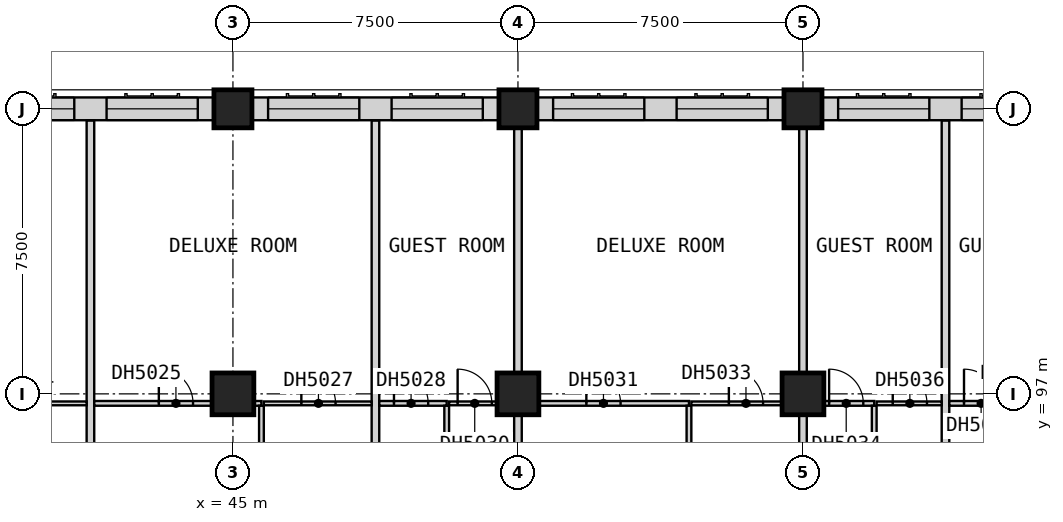
"""IFC4 building model, lengths in metres.
Left out: names, types, materials, properties, quantities, classifications, styles, units other than length and angle.
Written with IfcOpenShell. Run it as: python <this file> out.ifc"""

import sys

from ifc_helpers import new_model, si_unit, direction, frame, frame_2d, origin, origin_2d, place, context, subcontext, project, spatial, rectangle, extrude, element, fill, save


model = new_model("IFC4")
c1 = context("Model", 3, precision=1e-05, world=origin(), true_north=direction((0.0, 1.0)))
c2 = subcontext(c1, "Body", "Model", "MODEL_VIEW")
j1 = project(units=[si_unit("LENGTHUNIT", "METRE"), si_unit("PLANEANGLEUNIT", "RADIAN")], contexts=[c1])
p1 = place(None, origin())
s1 = spatial("IfcSite", under=j1, at=p1, CompositionType="ELEMENT")
p2 = place(p1, origin())
s2 = spatial("IfcBuilding", under=s1, at=p2, CompositionType="ELEMENT")
p3 = place(p2, frame((0.0, 0.0, 79.1)))
s3 = spatial("IfcBuildingStorey", under=s2, at=p3, CompositionType="ELEMENT", Elevation=79.1)
p4 = place(p3, frame((45.0, 97.0, 0.0), z_axis=(0.0, 0.0, 1.0), x_axis=(1.0, 0.0, 0.0)))
e1 = element("IfcColumn", 1, at=p4, inside=s3, PredefinedType="COLUMN", context=c2, shape_type="SweptSolid", body=[
    extrude(rectangle(XDim=1.1, YDim=1.1, at=origin_2d()), origin(), (0.0, 0.0, 1.0), 3.6),
])
p5 = place(p3, frame((45.0, 104.5, 0.0), z_axis=(0.0, 0.0, 1.0), x_axis=(1.0, 0.0, 0.0)))
e2 = element("IfcColumn", 2, at=p5, inside=s3, PredefinedType="COLUMN", context=c2, shape_type="SweptSolid", body=[
    extrude(rectangle(XDim=1.0, YDim=1.0, at=origin_2d()), origin(), (0.0, 0.0, 1.0), 3.6),
])
p6 = place(p3, frame((52.5, 97.0, 0.0), z_axis=(0.0, 0.0, 1.0), x_axis=(1.0, 0.0, 0.0)))
e3 = element("IfcColumn", 3, at=p6, inside=s3, PredefinedType="COLUMN", context=c2, shape_type="SweptSolid", body=[
    extrude(rectangle(XDim=1.1, YDim=1.1, at=origin_2d()), origin(), (0.0, 0.0, 1.0), 3.6),
])
p7 = place(p3, frame((52.5, 104.5, 0.0), z_axis=(0.0, 0.0, 1.0), x_axis=(1.0, 0.0, 0.0)))
e4 = element("IfcColumn", 4, at=p7, inside=s3, PredefinedType="COLUMN", context=c2, shape_type="SweptSolid", body=[
    extrude(rectangle(XDim=1.0, YDim=1.0, at=origin_2d()), origin(), (0.0, 0.0, 1.0), 3.6),
])
p8 = place(p3, frame((60.0, 97.0, 0.0), z_axis=(0.0, 0.0, 1.0), x_axis=(1.0, 0.0, 0.0)))
e5 = element("IfcColumn", 5, at=p8, inside=s3, PredefinedType="COLUMN", context=c2, shape_type="SweptSolid", body=[
    extrude(rectangle(XDim=1.1, YDim=1.1, at=origin_2d()), origin(), (0.0, 0.0, 1.0), 3.6),
])
p9 = place(p3, frame((60.0, 104.5, 0.0), z_axis=(0.0, 0.0, 1.0), x_axis=(1.0, 0.0, 0.0)))
e6 = element("IfcColumn", 6, at=p9, inside=s3, PredefinedType="COLUMN", context=c2, shape_type="SweptSolid", body=[
    extrude(rectangle(XDim=1.0, YDim=1.0, at=origin_2d()), origin(), (0.0, 0.0, 1.0), 3.6),
])
p10 = place(p3, frame((67.0, 104.5, 0.0), z_axis=(0.0, 0.0, 1.0), x_axis=(-1.0, 0.0, 0.0)))
e7 = element("IfcWall", 7, at=p10, inside=s3, PredefinedType="SOLIDWALL", context=c2, shape_type="SweptSolid", body=[
    extrude(rectangle(XDim=6.5, YDim=0.6, at=frame_2d((3.25, 0.0))), origin(), (0.0, 0.0, 1.0), 2.85),
])
p11 = place(p10, frame((3.675, 0.0, 0.8)))
e8 = element("IfcOpeningElement", 8, at=p11, cuts=e7, PredefinedType="OPENING", context=c2, shape_type="SweptSolid", body=[
    extrude(rectangle(XDim=2.4, YDim=1.8, at=frame_2d((1.2, 0.9))), frame((0.0, 0.31, 0.0), z_axis=(0.0, -1.0, 0.0), x_axis=(1.0, 0.0, 0.0)), (0.0, 0.0, 1.0), 0.62),
])
p12 = place(p10, frame((0.425, 0.0, 0.8)))
e9 = element("IfcOpeningElement", 9, at=p12, cuts=e7, PredefinedType="OPENING", context=c2, shape_type="SweptSolid", body=[
    extrude(rectangle(XDim=2.4, YDim=1.8, at=frame_2d((1.2, 0.9))), frame((0.0, 0.31, 0.0), z_axis=(0.0, -1.0, 0.0), x_axis=(1.0, 0.0, 0.0)), (0.0, 0.0, 1.0), 0.62),
])
p13 = place(p3, frame((59.5, 104.5, 0.0), z_axis=(0.0, 0.0, 1.0), x_axis=(-1.0, 0.0, 0.0)))
e10 = element("IfcWall", 10, at=p13, inside=s3, PredefinedType="SOLIDWALL", context=c2, shape_type="SweptSolid", body=[
    extrude(rectangle(XDim=6.5, YDim=0.6, at=frame_2d((3.25, 0.0))), origin(), (0.0, 0.0, 1.0), 2.85),
])
p14 = place(p13, frame((3.675, 0.0, 0.8)))
e11 = element("IfcOpeningElement", 11, at=p14, cuts=e10, PredefinedType="OPENING", context=c2, shape_type="SweptSolid", body=[
    extrude(rectangle(XDim=2.4, YDim=1.8, at=frame_2d((1.2, 0.9))), frame((0.0, 0.31, 0.0), z_axis=(0.0, -1.0, 0.0), x_axis=(1.0, 0.0, 0.0)), (0.0, 0.0, 1.0), 0.62),
])
p15 = place(p13, frame((0.425, 0.0, 0.8)))
e12 = element("IfcOpeningElement", 12, at=p15, cuts=e10, PredefinedType="OPENING", context=c2, shape_type="SweptSolid", body=[
    extrude(rectangle(XDim=2.4, YDim=1.8, at=frame_2d((1.2, 0.9))), frame((0.0, 0.31, 0.0), z_axis=(0.0, -1.0, 0.0), x_axis=(1.0, 0.0, 0.0)), (0.0, 0.0, 1.0), 0.62),
])
p16 = place(p3, frame((52.0, 104.5, 0.0), z_axis=(0.0, 0.0, 1.0), x_axis=(-1.0, 0.0, 0.0)))
e13 = element("IfcWall", 13, at=p16, inside=s3, PredefinedType="SOLIDWALL", context=c2, shape_type="SweptSolid", body=[
    extrude(rectangle(XDim=6.5, YDim=0.6, at=frame_2d((3.25, 0.0))), origin(), (0.0, 0.0, 1.0), 2.85),
])
p17 = place(p16, frame((3.675, 0.0, 0.8)))
e14 = element("IfcOpeningElement", 14, at=p17, cuts=e13, PredefinedType="OPENING", context=c2, shape_type="SweptSolid", body=[
    extrude(rectangle(XDim=2.4, YDim=1.8, at=frame_2d((1.2, 0.9))), frame((0.0, 0.31, 0.0), z_axis=(0.0, -1.0, 0.0), x_axis=(1.0, 0.0, 0.0)), (0.0, 0.0, 1.0), 0.62),
])
p18 = place(p16, frame((0.425, 0.0, 0.8)))
e15 = element("IfcOpeningElement", 15, at=p18, cuts=e13, PredefinedType="OPENING", context=c2, shape_type="SweptSolid", body=[
    extrude(rectangle(XDim=2.4, YDim=1.8, at=frame_2d((1.2, 0.9))), frame((0.0, 0.31, 0.0), z_axis=(0.0, -1.0, 0.0), x_axis=(1.0, 0.0, 0.0)), (0.0, 0.0, 1.0), 0.62),
])
p19 = place(p3, frame((44.5, 104.5, 0.0), z_axis=(0.0, 0.0, 1.0), x_axis=(-1.0, 0.0, 0.0)))
e16 = element("IfcWall", 16, at=p19, inside=s3, PredefinedType="SOLIDWALL", context=c2, shape_type="SweptSolid", body=[
    extrude(rectangle(XDim=6.5, YDim=0.6, at=frame_2d((3.25, 0.0))), origin(), (0.0, 0.0, 1.0), 2.85),
])
p20 = place(p19, frame((3.675, 0.0, 0.8)))
e17 = element("IfcOpeningElement", 17, at=p20, cuts=e16, PredefinedType="OPENING", context=c2, shape_type="SweptSolid", body=[
    extrude(rectangle(XDim=2.4, YDim=1.8, at=frame_2d((1.2, 0.9))), frame((0.0, 0.31, 0.0), z_axis=(0.0, -1.0, 0.0), x_axis=(1.0, 0.0, 0.0)), (0.0, 0.0, 1.0), 0.62),
])
p21 = place(p19, frame((0.425, 0.0, 0.8)))
e18 = element("IfcOpeningElement", 18, at=p21, cuts=e16, PredefinedType="OPENING", context=c2, shape_type="SweptSolid", body=[
    extrude(rectangle(XDim=2.4, YDim=1.8, at=frame_2d((1.2, 0.9))), frame((0.0, 0.31, 0.0), z_axis=(0.0, -1.0, 0.0), x_axis=(1.0, 0.0, 0.0)), (0.0, 0.0, 1.0), 0.62),
])
for number, where, z_axis, x_axis in (
    (19, (41.25, 92.475, 0.0), (0.0, 0.0, 1.0), (0.0, 1.0, 0.0)),
    (20, (48.75, 92.475, 0.0), (0.0, 0.0, 1.0), (0.0, 1.0, 0.0)),
):
    element("IfcWall", number, at=place(p3, frame(where, z_axis=z_axis, x_axis=x_axis)), inside=s3, PredefinedType="PARTITIONING", context=c2, shape_type="SweptSolid", body=[
        extrude(rectangle(XDim=11.715, YDim=0.2, at=frame_2d((5.857, 0.0))), origin(), (0.0, 0.0, 1.0), 3.35),
    ])
for number, where, z_axis, x_axis in (
    (21, (52.5, 92.475, 0.0), (0.0, 0.0, 1.0), (0.0, 1.0, 0.0)),
    (22, (60.0, 92.475, 0.0), (0.0, 0.0, 1.0), (0.0, 1.0, 0.0)),
):
    element("IfcWall", number, at=place(p3, frame(where, z_axis=z_axis, x_axis=x_axis)), inside=s3, PredefinedType="PARTITIONING", context=c2, shape_type="SweptSolid", body=[
        extrude(rectangle(XDim=12.525, YDim=0.2, at=frame_2d((6.262, 0.0))), origin(), (0.0, 0.0, 1.0), 3.35),
    ])
p22 = place(p3, frame((63.75, 92.475, 0.0), z_axis=(0.0, 0.0, 1.0), x_axis=(0.0, 1.0, 0.0)))
e23 = element("IfcWall", 23, at=p22, inside=s3, PredefinedType="PARTITIONING", context=c2, shape_type="SweptSolid", body=[
    extrude(rectangle(XDim=11.715, YDim=0.2, at=frame_2d((5.857, 0.0))), origin(), (0.0, 0.0, 1.0), 3.35),
])
p23 = place(p3, frame((33.812, 96.75, 0.0), z_axis=(0.0, 0.0, 1.0), x_axis=(1.0, 0.0, 0.0)))
e24 = element("IfcWall", 24, at=p23, inside=s3, PredefinedType="PARTITIONING", context=c2, shape_type="SweptSolid", body=[
    extrude(rectangle(XDim=7.337, YDim=0.1, at=frame_2d((3.669, 0.0))), origin(), (0.0, 0.0, 1.0), 3.35),
])
p24 = place(p23, frame((5.113, 0.0, 0.0)))
e25 = element("IfcOpeningElement", 25, at=p24, cuts=e24, PredefinedType="OPENING", context=c2, shape_type="SweptSolid", body=[
    extrude(rectangle(XDim=0.9, YDim=2.1, at=frame_2d((0.45, 1.05))), frame((0.0, 0.06, 0.0), z_axis=(0.0, -1.0, 0.0), x_axis=(1.0, 0.0, 0.0)), (0.0, 0.0, 1.0), 0.12),
])
p25 = place(p3, frame((45.812, 96.75, 0.0), z_axis=(0.0, 0.0, 1.0), x_axis=(1.0, 0.0, 0.0)))
e26 = element("IfcWall", 26, at=p25, inside=s3, PredefinedType="PARTITIONING", context=c2, shape_type="SweptSolid", body=[
    extrude(rectangle(XDim=2.837, YDim=0.1, at=frame_2d((1.419, 0.0))), origin(), (0.0, 0.0, 1.0), 3.35),
])
p26 = place(p25, frame((0.988, 0.0, 0.0)))
e27 = element("IfcOpeningElement", 27, at=p26, cuts=e26, PredefinedType="OPENING", context=c2, shape_type="SweptSolid", body=[
    extrude(rectangle(XDim=0.9, YDim=2.1, at=frame_2d((0.45, 1.05))), frame((0.0, 0.06, 0.0), z_axis=(0.0, -1.0, 0.0), x_axis=(1.0, 0.0, 0.0)), (0.0, 0.0, 1.0), 0.12),
])
p27 = place(p3, frame((50.688, 96.75, 0.0), z_axis=(0.0, 0.0, 1.0), x_axis=(1.0, 0.0, 0.0)))
e28 = element("IfcWall", 28, at=p27, inside=s3, PredefinedType="PARTITIONING", context=c2, shape_type="SweptSolid", body=[
    extrude(rectangle(XDim=1.712, YDim=0.1, at=frame_2d((0.856, 0.0))), origin(), (0.0, 0.0, 1.0), 3.35),
])
p28 = place(p27, frame((0.225, 0.0, 0.0)))
e29 = element("IfcOpeningElement", 29, at=p28, cuts=e28, PredefinedType="OPENING", context=c2, shape_type="SweptSolid", body=[
    extrude(rectangle(XDim=0.9, YDim=2.1, at=frame_2d((0.45, 1.05))), frame((0.0, 0.06, 0.0), z_axis=(0.0, -1.0, 0.0), x_axis=(1.0, 0.0, 0.0)), (0.0, 0.0, 1.0), 0.12),
])
p29 = place(p3, frame((57.062, 96.75, 0.0), z_axis=(0.0, 0.0, 1.0), x_axis=(1.0, 0.0, 0.0)))
e30 = element("IfcWall", 30, at=p29, inside=s3, PredefinedType="PARTITIONING", context=c2, shape_type="SweptSolid", body=[
    extrude(rectangle(XDim=2.837, YDim=0.1, at=frame_2d((1.419, 0.0))), origin(), (0.0, 0.0, 1.0), 3.35),
])
p30 = place(p29, frame((0.988, 0.0, 0.0)))
e31 = element("IfcOpeningElement", 31, at=p30, cuts=e30, PredefinedType="OPENING", context=c2, shape_type="SweptSolid", body=[
    extrude(rectangle(XDim=0.9, YDim=2.1, at=frame_2d((0.45, 1.05))), frame((0.0, 0.06, 0.0), z_axis=(0.0, -1.0, 0.0), x_axis=(1.0, 0.0, 0.0)), (0.0, 0.0, 1.0), 0.12),
])
p31 = place(p3, frame((61.938, 96.75, 0.0), z_axis=(0.0, 0.0, 1.0), x_axis=(1.0, 0.0, 0.0)))
e32 = element("IfcWall", 32, at=p31, inside=s3, PredefinedType="PARTITIONING", context=c2, shape_type="SweptSolid", body=[
    extrude(rectangle(XDim=1.712, YDim=0.1, at=frame_2d((0.856, 0.0))), origin(), (0.0, 0.0, 1.0), 3.35),
])
p32 = place(p31, frame((0.425, 0.0, 0.0)))
e33 = element("IfcOpeningElement", 33, at=p32, cuts=e32, PredefinedType="OPENING", context=c2, shape_type="SweptSolid", body=[
    extrude(rectangle(XDim=0.9, YDim=2.1, at=frame_2d((0.45, 1.05))), frame((0.0, 0.06, 0.0), z_axis=(0.0, -1.0, 0.0), x_axis=(1.0, 0.0, 0.0)), (0.0, 0.0, 1.0), 0.12),
])
p33 = place(p3, frame((41.35, 96.75, 0.0), z_axis=(0.0, 0.0, 1.0), x_axis=(1.0, 0.0, 0.0)))
e34 = element("IfcWall", 34, at=p33, inside=s3, PredefinedType="PARTITIONING", context=c2, shape_type="SweptSolid", body=[
    extrude(rectangle(XDim=4.4, YDim=0.125, at=frame_2d((2.2, 0.0))), origin(), (0.0, 0.0, 1.0), 3.35),
])
p34 = place(p33, frame((1.7, 0.0, 0.0)))
e35 = element("IfcOpeningElement", 35, at=p34, cuts=e34, PredefinedType="OPENING", context=c2, shape_type="SweptSolid", body=[
    extrude(rectangle(XDim=0.9, YDim=2.1, at=frame_2d((0.45, 1.05))), frame((0.0, 0.073, 0.0), z_axis=(0.0, -1.0, 0.0), x_axis=(1.0, 0.0, 0.0)), (0.0, 0.0, 1.0), 0.145),
])
p35 = place(p3, frame((48.85, 96.75, 0.0), z_axis=(0.0, 0.0, 1.0), x_axis=(1.0, 0.0, 0.0)))
e36 = element("IfcWall", 36, at=p35, inside=s3, PredefinedType="PARTITIONING", context=c2, shape_type="SweptSolid", body=[
    extrude(rectangle(XDim=1.775, YDim=0.125, at=frame_2d((0.887, 0.0))), origin(), (0.0, 0.0, 1.0), 3.35),
])
p36 = place(p35, frame((0.387, 0.0, 0.0)))
e37 = element("IfcOpeningElement", 37, at=p36, cuts=e36, PredefinedType="OPENING", context=c2, shape_type="SweptSolid", body=[
    extrude(rectangle(XDim=0.9, YDim=2.1, at=frame_2d((0.45, 1.05))), frame((0.0, 0.073, 0.0), z_axis=(0.0, -1.0, 0.0), x_axis=(1.0, 0.0, 0.0)), (0.0, 0.0, 1.0), 0.145),
])
p37 = place(p3, frame((52.6, 96.75, 0.0), z_axis=(0.0, 0.0, 1.0), x_axis=(1.0, 0.0, 0.0)))
e38 = element("IfcWall", 38, at=p37, inside=s3, PredefinedType="PARTITIONING", context=c2, shape_type="SweptSolid", body=[
    extrude(rectangle(XDim=4.4, YDim=0.125, at=frame_2d((2.2, 0.0))), origin(), (0.0, 0.0, 1.0), 3.35),
])
p38 = place(p37, frame((1.7, 0.0, 0.0)))
e39 = element("IfcOpeningElement", 39, at=p38, cuts=e38, PredefinedType="OPENING", context=c2, shape_type="SweptSolid", body=[
    extrude(rectangle(XDim=0.9, YDim=2.1, at=frame_2d((0.45, 1.05))), frame((0.0, 0.073, 0.0), z_axis=(0.0, -1.0, 0.0), x_axis=(1.0, 0.0, 0.0)), (0.0, 0.0, 1.0), 0.145),
])
p39 = place(p3, frame((60.1, 96.75, 0.0), z_axis=(0.0, 0.0, 1.0), x_axis=(1.0, 0.0, 0.0)))
e40 = element("IfcWall", 40, at=p39, inside=s3, PredefinedType="PARTITIONING", context=c2, shape_type="SweptSolid", body=[
    extrude(rectangle(XDim=1.775, YDim=0.125, at=frame_2d((0.887, 0.0))), origin(), (0.0, 0.0, 1.0), 3.35),
])
p40 = place(p39, frame((0.587, 0.0, 0.0)))
e41 = element("IfcOpeningElement", 41, at=p40, cuts=e40, PredefinedType="OPENING", context=c2, shape_type="SweptSolid", body=[
    extrude(rectangle(XDim=0.9, YDim=2.1, at=frame_2d((0.45, 1.05))), frame((0.0, 0.073, 0.0), z_axis=(0.0, -1.0, 0.0), x_axis=(1.0, 0.0, 0.0)), (0.0, 0.0, 1.0), 0.145),
])
p41 = place(p3, frame((63.85, 96.75, 0.0), z_axis=(0.0, 0.0, 1.0), x_axis=(1.0, 0.0, 0.0)))
e42 = element("IfcWall", 42, at=p41, inside=s3, PredefinedType="PARTITIONING", context=c2, shape_type="SweptSolid", body=[
    extrude(rectangle(XDim=1.775, YDim=0.125, at=frame_2d((0.887, 0.0))), origin(), (0.0, 0.0, 1.0), 3.35),
])
p42 = place(p41, frame((0.387, 0.0, 0.0)))
e43 = element("IfcOpeningElement", 43, at=p42, cuts=e42, PredefinedType="OPENING", context=c2, shape_type="SweptSolid", body=[
    extrude(rectangle(XDim=0.9, YDim=2.1, at=frame_2d((0.45, 1.05))), frame((0.0, 0.073, 0.0), z_axis=(0.0, -1.0, 0.0), x_axis=(1.0, 0.0, 0.0)), (0.0, 0.0, 1.0), 0.145),
])
for number, where, z_axis, x_axis in (
    (44, (45.75, 92.475, 0.0), (0.0, 0.0, 1.0), (0.0, 1.0, 0.0)),
    (45, (50.625, 92.475, 0.0), (0.0, 0.0, 1.0), (0.0, 1.0, 0.0)),
    (46, (57.0, 92.475, 0.0), (0.0, 0.0, 1.0), (0.0, 1.0, 0.0)),
    (47, (61.875, 92.475, 0.0), (0.0, 0.0, 1.0), (0.0, 1.0, 0.0)),
):
    element("IfcWall", number, at=place(p3, frame(where, z_axis=z_axis, x_axis=x_axis)), inside=s3, PredefinedType="PARTITIONING", context=c2, shape_type="SweptSolid", body=[
        extrude(rectangle(XDim=4.212, YDim=0.125, at=frame_2d((2.106, 0.0))), origin(), (0.0, 0.0, 1.0), 3.35),
    ])
p43 = place(p11, origin())
e48 = element("IfcWindow", 48, at=p43, inside=s3, PartitioningType="SINGLE_PANEL", PredefinedType="WINDOW", context=c2, shape_type="SweptSolid", body=[
    extrude(rectangle(XDim=2.4, YDim=1.8, at=frame_2d((1.2, 0.9))), frame((0.0, -0.07, 0.0), z_axis=(0.0, -1.0, 0.0), x_axis=(1.0, 0.0, 0.0)), (0.0, 0.0, 1.0), 0.06),
])
fill(e8, e48)
p44 = place(p12, origin())
e49 = element("IfcWindow", 49, at=p44, inside=s3, PartitioningType="SINGLE_PANEL", PredefinedType="WINDOW", context=c2, shape_type="SweptSolid", body=[
    extrude(rectangle(XDim=2.4, YDim=1.8, at=frame_2d((1.2, 0.9))), frame((0.0, -0.07, 0.0), z_axis=(0.0, -1.0, 0.0), x_axis=(1.0, 0.0, 0.0)), (0.0, 0.0, 1.0), 0.06),
])
fill(e9, e49)
p45 = place(p14, origin())
e50 = element("IfcWindow", 50, at=p45, inside=s3, PartitioningType="SINGLE_PANEL", PredefinedType="WINDOW", context=c2, shape_type="SweptSolid", body=[
    extrude(rectangle(XDim=2.4, YDim=1.8, at=frame_2d((1.2, 0.9))), frame((0.0, -0.07, 0.0), z_axis=(0.0, -1.0, 0.0), x_axis=(1.0, 0.0, 0.0)), (0.0, 0.0, 1.0), 0.06),
])
fill(e11, e50)
p46 = place(p15, origin())
e51 = element("IfcWindow", 51, at=p46, inside=s3, PartitioningType="SINGLE_PANEL", PredefinedType="WINDOW", context=c2, shape_type="SweptSolid", body=[
    extrude(rectangle(XDim=2.4, YDim=1.8, at=frame_2d((1.2, 0.9))), frame((0.0, -0.07, 0.0), z_axis=(0.0, -1.0, 0.0), x_axis=(1.0, 0.0, 0.0)), (0.0, 0.0, 1.0), 0.06),
])
fill(e12, e51)
p47 = place(p17, origin())
e52 = element("IfcWindow", 52, at=p47, inside=s3, PartitioningType="SINGLE_PANEL", PredefinedType="WINDOW", context=c2, shape_type="SweptSolid", body=[
    extrude(rectangle(XDim=2.4, YDim=1.8, at=frame_2d((1.2, 0.9))), frame((0.0, -0.07, 0.0), z_axis=(0.0, -1.0, 0.0), x_axis=(1.0, 0.0, 0.0)), (0.0, 0.0, 1.0), 0.06),
])
fill(e14, e52)
p48 = place(p18, origin())
e53 = element("IfcWindow", 53, at=p48, inside=s3, PartitioningType="SINGLE_PANEL", PredefinedType="WINDOW", context=c2, shape_type="SweptSolid", body=[
    extrude(rectangle(XDim=2.4, YDim=1.8, at=frame_2d((1.2, 0.9))), frame((0.0, -0.07, 0.0), z_axis=(0.0, -1.0, 0.0), x_axis=(1.0, 0.0, 0.0)), (0.0, 0.0, 1.0), 0.06),
])
fill(e15, e53)
p49 = place(p20, origin())
e54 = element("IfcWindow", 54, at=p49, inside=s3, PartitioningType="SINGLE_PANEL", PredefinedType="WINDOW", context=c2, shape_type="SweptSolid", body=[
    extrude(rectangle(XDim=2.4, YDim=1.8, at=frame_2d((1.2, 0.9))), frame((0.0, -0.07, 0.0), z_axis=(0.0, -1.0, 0.0), x_axis=(1.0, 0.0, 0.0)), (0.0, 0.0, 1.0), 0.06),
])
fill(e17, e54)
p50 = place(p21, origin())
e55 = element("IfcWindow", 55, at=p50, inside=s3, PartitioningType="SINGLE_PANEL", PredefinedType="WINDOW", context=c2, shape_type="SweptSolid", body=[
    extrude(rectangle(XDim=2.4, YDim=1.8, at=frame_2d((1.2, 0.9))), frame((0.0, -0.07, 0.0), z_axis=(0.0, -1.0, 0.0), x_axis=(1.0, 0.0, 0.0)), (0.0, 0.0, 1.0), 0.06),
])
fill(e18, e55)
p51 = place(p34, origin())
e56 = element("IfcDoor", 56, at=p51, inside=s3, OperationType="SINGLE_SWING_RIGHT", PredefinedType="DOOR", context=c2, shape_type="SweptSolid", body=[
    extrude(rectangle(XDim=0.9, YDim=2.1, at=frame_2d((0.45, 1.05))), frame((0.0, 0.025, 0.0), z_axis=(0.0, -1.0, 0.0), x_axis=(1.0, 0.0, 0.0)), (0.0, 0.0, 1.0), 0.05),
])
fill(e35, e56)
p52 = place(p26, origin())
e57 = element("IfcDoor", 57, at=p52, inside=s3, OperationType="SINGLE_SWING_RIGHT", PredefinedType="DOOR", context=c2, shape_type="SweptSolid", body=[
    extrude(rectangle(XDim=0.9, YDim=2.1, at=frame_2d((0.45, 1.05))), frame((0.0, 0.025, 0.0), z_axis=(0.0, -1.0, 0.0), x_axis=(1.0, 0.0, 0.0)), (0.0, 0.0, 1.0), 0.05),
])
fill(e27, e57)
p53 = place(p36, origin())
e58 = element("IfcDoor", 58, at=p53, inside=s3, OperationType="SINGLE_SWING_RIGHT", PredefinedType="DOOR", context=c2, shape_type="SweptSolid", body=[
    extrude(rectangle(XDim=0.9, YDim=2.1, at=frame_2d((0.45, 1.05))), frame((0.0, 0.025, 0.0), z_axis=(0.0, -1.0, 0.0), x_axis=(1.0, 0.0, 0.0)), (0.0, 0.0, 1.0), 0.05),
])
fill(e37, e58)
p54 = place(p28, origin())
e59 = element("IfcDoor", 59, at=p54, inside=s3, OperationType="SINGLE_SWING_RIGHT", PredefinedType="DOOR", context=c2, shape_type="SweptSolid", body=[
    extrude(rectangle(XDim=0.9, YDim=2.1, at=frame_2d((0.45, 1.05))), frame((0.0, 0.025, 0.0), z_axis=(0.0, -1.0, 0.0), x_axis=(1.0, 0.0, 0.0)), (0.0, 0.0, 1.0), 0.05),
])
fill(e29, e59)
p55 = place(p38, origin())
e60 = element("IfcDoor", 60, at=p55, inside=s3, OperationType="SINGLE_SWING_RIGHT", PredefinedType="DOOR", context=c2, shape_type="SweptSolid", body=[
    extrude(rectangle(XDim=0.9, YDim=2.1, at=frame_2d((0.45, 1.05))), frame((0.0, 0.025, 0.0), z_axis=(0.0, -1.0, 0.0), x_axis=(1.0, 0.0, 0.0)), (0.0, 0.0, 1.0), 0.05),
])
fill(e39, e60)
p56 = place(p30, origin())
e61 = element("IfcDoor", 61, at=p56, inside=s3, OperationType="SINGLE_SWING_RIGHT", PredefinedType="DOOR", context=c2, shape_type="SweptSolid", body=[
    extrude(rectangle(XDim=0.9, YDim=2.1, at=frame_2d((0.45, 1.05))), frame((0.0, 0.025, 0.0), z_axis=(0.0, -1.0, 0.0), x_axis=(1.0, 0.0, 0.0)), (0.0, 0.0, 1.0), 0.05),
])
fill(e31, e61)
p57 = place(p40, origin())
e62 = element("IfcDoor", 62, at=p57, inside=s3, OperationType="SINGLE_SWING_LEFT", PredefinedType="DOOR", context=c2, shape_type="SweptSolid", body=[
    extrude(rectangle(XDim=0.9, YDim=2.1, at=frame_2d((0.45, 1.05))), frame((0.0, 0.025, 0.0), z_axis=(0.0, -1.0, 0.0), x_axis=(1.0, 0.0, 0.0)), (0.0, 0.0, 1.0), 0.05),
])
fill(e41, e62)
p58 = place(p32, origin())
e63 = element("IfcDoor", 63, at=p58, inside=s3, OperationType="SINGLE_SWING_RIGHT", PredefinedType="DOOR", context=c2, shape_type="SweptSolid", body=[
    extrude(rectangle(XDim=0.9, YDim=2.1, at=frame_2d((0.45, 1.05))), frame((0.0, 0.025, 0.0), z_axis=(0.0, -1.0, 0.0), x_axis=(1.0, 0.0, 0.0)), (0.0, 0.0, 1.0), 0.05),
])
fill(e33, e63)
p59 = place(p42, origin())
e64 = element("IfcDoor", 64, at=p59, inside=s3, OperationType="SINGLE_SWING_RIGHT", PredefinedType="DOOR", context=c2, shape_type="SweptSolid", body=[
    extrude(rectangle(XDim=0.9, YDim=2.1, at=frame_2d((0.45, 1.05))), frame((0.0, 0.025, 0.0), z_axis=(0.0, -1.0, 0.0), x_axis=(1.0, 0.0, 0.0)), (0.0, 0.0, 1.0), 0.05),
])
fill(e43, e64)
save(model, sys.argv[1])
